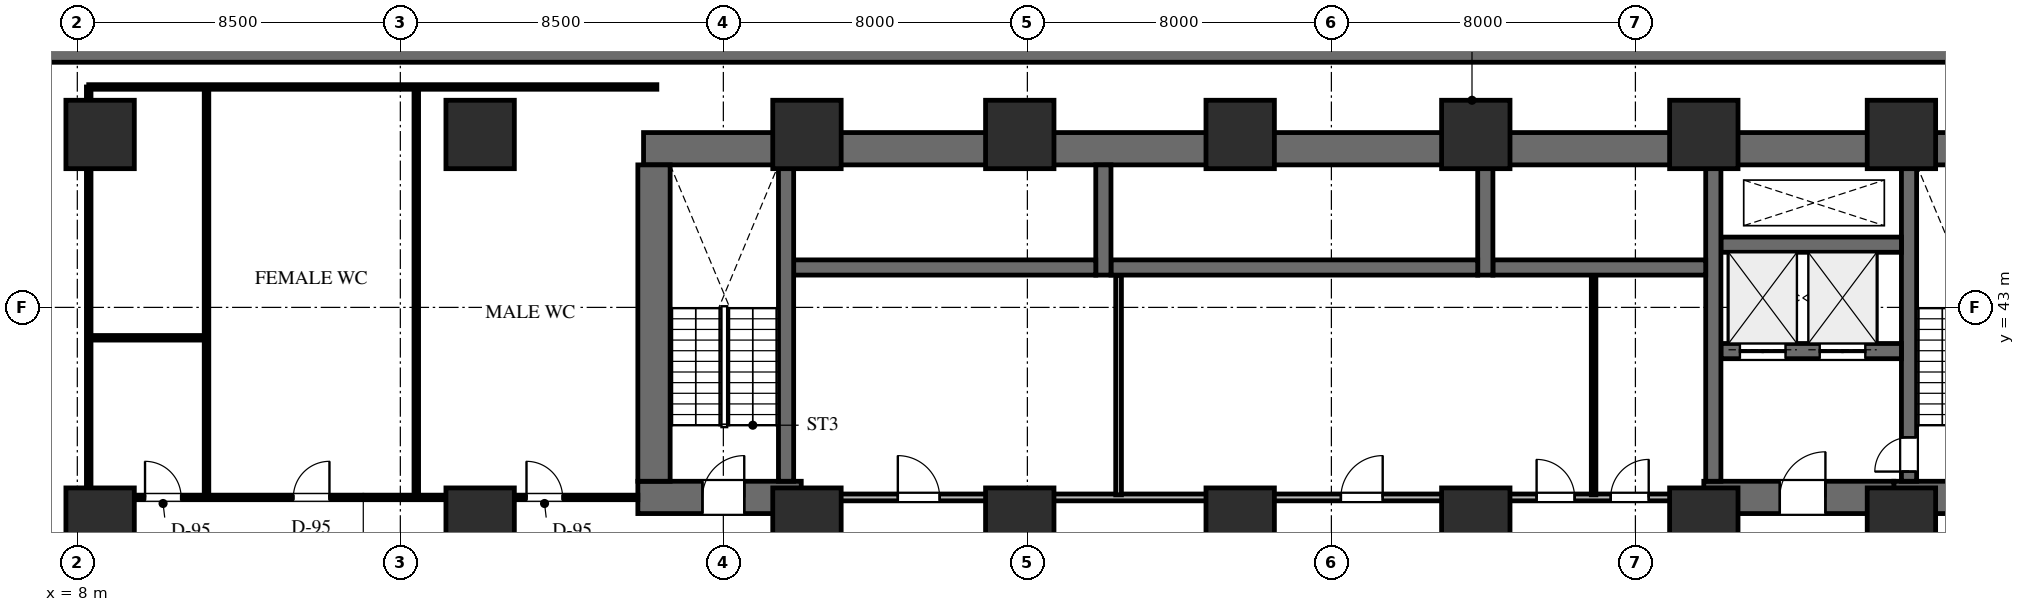
"""IFC4 building model, lengths in metres.
Left out: names, types, materials, properties, quantities, classifications, styles, units other than length and angle.
Written with IfcOpenShell. Run it as: python <this file> out.ifc"""

import sys

from ifc_helpers import new_model, si_unit, direction, frame, frame_2d, origin, origin_2d, place, context, subcontext, project, spatial, rectangle, extrude, element, fill, save


model = new_model("IFC4")
c1 = context("Model", 3, precision=1e-05, world=origin(), true_north=direction((0.0, 1.0)))
c2 = subcontext(c1, "Body", "Model", "MODEL_VIEW")
j1 = project(units=[si_unit("LENGTHUNIT", "METRE"), si_unit("PLANEANGLEUNIT", "RADIAN")], contexts=[c1])
p1 = place(None, origin())
s1 = spatial("IfcSite", under=j1, at=p1, CompositionType="ELEMENT")
p2 = place(p1, origin())
s2 = spatial("IfcBuilding", under=s1, at=p2, CompositionType="ELEMENT")
p3 = place(p2, frame((0.0, 0.0, -4.2)))
s3 = spatial("IfcBuildingStorey", under=s2, at=p3, CompositionType="ELEMENT", Elevation=-4.2)
p4 = place(p3, frame((22.9, 47.175, 0.0), z_axis=(0.0, 0.0, 1.0), x_axis=(1.0, 0.0, 0.0)))
e1 = element("IfcWall", 1, at=p4, inside=s3, PredefinedType="SHEAR", context=c2, shape_type="SweptSolid", body=[
    extrude(rectangle(XDim=43.8, YDim=0.85, at=frame_2d((21.9, 0.0))), origin(), (0.0, 0.0, 1.0), 4.2),
])
p5 = place(p3, frame((55.8, 38.0, 0.0), z_axis=(0.0, 0.0, 1.0), x_axis=(1.0, 0.0, 0.0)))
e2 = element("IfcWall", 2, at=p5, inside=s3, PredefinedType="SHEAR", context=c2, shape_type="SweptSolid", body=[
    extrude(rectangle(XDim=10.9, YDim=0.85, at=frame_2d((5.45, 0.0))), origin(), (0.0, 0.0, 1.0), 4.2),
])
p6 = place(p5, frame((1.5, 0.0, 0.0)))
e3 = element("IfcOpeningElement", 3, at=p6, cuts=e2, PredefinedType="OPENING", context=c2, shape_type="SweptSolid", body=[
    extrude(rectangle(XDim=1.1, YDim=2.2, at=frame_2d((0.55, 1.1))), frame((0.0, 0.435, 0.0), z_axis=(0.0, -1.0, 0.0), x_axis=(1.0, 0.0, 0.0)), (0.0, 0.0, 1.0), 0.87),
])
p7 = place(p5, frame((4.82, 0.0, 0.0)))
e4 = element("IfcOpeningElement", 4, at=p7, cuts=e2, PredefinedType="OPENING", context=c2, shape_type="SweptSolid", body=[
    extrude(rectangle(XDim=1.0, YDim=2.15, at=frame_2d((0.5, 1.075))), frame((0.0, 0.435, 0.0), z_axis=(0.0, -1.0, 0.0), x_axis=(1.0, 0.0, 0.0)), (0.0, 0.0, 1.0), 0.87),
])
p8 = place(p5, frame((8.05, 0.0, 0.0)))
e5 = element("IfcOpeningElement", 5, at=p8, cuts=e2, PredefinedType="OPENING", context=c2, shape_type="SweptSolid", body=[
    extrude(rectangle(XDim=1.1, YDim=2.2, at=frame_2d((0.55, 1.1))), frame((0.0, 0.435, 0.0), z_axis=(0.0, -1.0, 0.0), x_axis=(1.0, 0.0, 0.0)), (0.0, 0.0, 1.0), 0.87),
])
p9 = place(p3, frame((56.2, 38.425, 0.0), z_axis=(0.0, 0.0, 1.0), x_axis=(0.0, 1.0, 0.0)))
e6 = element("IfcWall", 6, at=p9, inside=s3, PredefinedType="SHEAR", context=c2, shape_type="SweptSolid", body=[
    extrude(rectangle(XDim=8.325, YDim=0.4, at=frame_2d((4.163, 0.0))), origin(), (0.0, 0.0, 1.0), 4.2),
])
p10 = place(p9, frame((0.255, 0.0, 0.0)))
e7 = element("IfcOpeningElement", 7, at=p10, cuts=e6, PredefinedType="OPENING", context=c2, shape_type="SweptSolid", body=[
    extrude(rectangle(XDim=0.9, YDim=2.15, at=frame_2d((0.45, 1.075))), frame((0.0, 0.21, 0.0), z_axis=(0.0, -1.0, 0.0), x_axis=(1.0, 0.0, 0.0)), (0.0, 0.0, 1.0), 0.42),
])
p11 = place(p3, frame((50.8, 38.0, 0.0), z_axis=(0.0, 0.0, 1.0), x_axis=(1.0, 0.0, 0.0)))
e8 = element("IfcWall", 8, at=p11, inside=s3, PredefinedType="SHEAR", context=c2, shape_type="SweptSolid", body=[
    extrude(rectangle(XDim=5.0, YDim=0.85, at=frame_2d((2.5, 0.0))), origin(), (0.0, 0.0, 1.0), 4.2),
])
p12 = place(p11, frame((2.0, 0.0, 0.0)))
e9 = element("IfcOpeningElement", 9, at=p12, cuts=e8, PredefinedType="OPENING", context=c2, shape_type="SweptSolid", body=[
    extrude(rectangle(XDim=1.2, YDim=2.2, at=frame_2d((0.6, 1.1))), frame((0.0, 0.435, 0.0), z_axis=(0.0, -1.0, 0.0), x_axis=(1.0, 0.0, 0.0)), (0.0, 0.0, 1.0), 0.87),
])
p13 = place(p3, frame((51.25, 41.85, 0.0), z_axis=(0.0, 0.0, 1.0), x_axis=(1.0, 0.0, 0.0)))
e10 = element("IfcWall", 10, at=p13, inside=s3, PredefinedType="SHEAR", context=c2, shape_type="SweptSolid", body=[
    extrude(rectangle(XDim=4.75, YDim=0.4, at=frame_2d((2.375, 0.0))), origin(), (0.0, 0.0, 1.0), 4.2),
])
p14 = place(p13, frame((0.5, 0.0, 0.0)))
e11 = element("IfcOpeningElement", 11, at=p14, cuts=e10, PredefinedType="OPENING", context=c2, shape_type="SweptSolid", body=[
    extrude(rectangle(XDim=1.2, YDim=2.2, at=frame_2d((0.6, 1.1))), frame((0.0, 0.21, 0.0), z_axis=(0.0, -1.0, 0.0), x_axis=(1.0, 0.0, 0.0)), (0.0, 0.0, 1.0), 0.42),
])
p15 = place(p13, frame((2.6, 0.0, 0.0)))
e12 = element("IfcOpeningElement", 12, at=p15, cuts=e10, PredefinedType="OPENING", context=c2, shape_type="SweptSolid", body=[
    extrude(rectangle(XDim=1.2, YDim=2.2, at=frame_2d((0.6, 1.1))), frame((0.0, 0.21, 0.0), z_axis=(0.0, -1.0, 0.0), x_axis=(1.0, 0.0, 0.0)), (0.0, 0.0, 1.0), 0.42),
])
p16 = place(p3, frame((51.25, 44.65, 0.0), z_axis=(0.0, 0.0, 1.0), x_axis=(1.0, 0.0, 0.0)))
e13 = element("IfcWall", 13, at=p16, inside=s3, PredefinedType="SHEAR", context=c2, shape_type="SweptSolid", body=[
    extrude(rectangle(XDim=4.75, YDim=0.4, at=frame_2d((2.375, 0.0))), origin(), (0.0, 0.0, 1.0), 4.2),
])
p17 = place(p3, frame((51.05, 38.425, 0.0), z_axis=(0.0, 0.0, 1.0), x_axis=(0.0, 1.0, 0.0)))
e14 = element("IfcWall", 14, at=p17, inside=s3, PredefinedType="SHEAR", context=c2, shape_type="SweptSolid", body=[
    extrude(rectangle(XDim=8.325, YDim=0.4, at=frame_2d((4.163, 0.0))), origin(), (0.0, 0.0, 1.0), 4.2),
])
p18 = place(p3, frame((45.25, 44.05, 0.0), z_axis=(0.0, 0.0, 1.0), x_axis=(1.0, 0.0, 0.0)))
e15 = element("IfcWall", 15, at=p18, inside=s3, PredefinedType="SHEAR", context=c2, shape_type="SweptSolid", body=[
    extrude(rectangle(XDim=5.6, YDim=0.4, at=frame_2d((2.8, 0.0))), origin(), (0.0, 0.0, 1.0), 4.2),
])
p19 = place(p3, frame((45.05, 43.85, 0.0), z_axis=(0.0, 0.0, 1.0), x_axis=(0.0, 1.0, 0.0)))
e16 = element("IfcWall", 16, at=p19, inside=s3, PredefinedType="SHEAR", context=c2, shape_type="SweptSolid", body=[
    extrude(rectangle(XDim=2.9, YDim=0.4, at=frame_2d((1.45, 0.0))), origin(), (0.0, 0.0, 1.0), 4.2),
])
p20 = place(p3, frame((35.2, 44.05, 0.0), z_axis=(0.0, 0.0, 1.0), x_axis=(1.0, 0.0, 0.0)))
e17 = element("IfcWall", 17, at=p20, inside=s3, PredefinedType="SHEAR", context=c2, shape_type="SweptSolid", body=[
    extrude(rectangle(XDim=9.65, YDim=0.4, at=frame_2d((4.825, 0.0))), origin(), (0.0, 0.0, 1.0), 4.2),
])
p21 = place(p3, frame((35.0, 43.85, 0.0), z_axis=(0.0, 0.0, 1.0), x_axis=(0.0, 1.0, 0.0)))
e18 = element("IfcWall", 18, at=p21, inside=s3, PredefinedType="SHEAR", context=c2, shape_type="SweptSolid", body=[
    extrude(rectangle(XDim=2.9, YDim=0.4, at=frame_2d((1.45, 0.0))), origin(), (0.0, 0.0, 1.0), 4.2),
])
p22 = place(p3, frame((26.85, 44.05, 0.0), z_axis=(0.0, 0.0, 1.0), x_axis=(1.0, 0.0, 0.0)))
e19 = element("IfcWall", 19, at=p22, inside=s3, PredefinedType="SHEAR", context=c2, shape_type="SweptSolid", body=[
    extrude(rectangle(XDim=7.95, YDim=0.4, at=frame_2d((3.975, 0.0))), origin(), (0.0, 0.0, 1.0), 4.2),
])
p23 = place(p3, frame((22.75, 38.0, 0.0), z_axis=(0.0, 0.0, 1.0), x_axis=(1.0, 0.0, 0.0)))
e20 = element("IfcWall", 20, at=p23, inside=s3, PredefinedType="SHEAR", context=c2, shape_type="SweptSolid", body=[
    extrude(rectangle(XDim=4.3, YDim=0.85, at=frame_2d((2.15, 0.0))), origin(), (0.0, 0.0, 1.0), 4.2),
])
p24 = place(p23, frame((1.7, 0.0, 0.0)))
e21 = element("IfcOpeningElement", 21, at=p24, cuts=e20, PredefinedType="OPENING", context=c2, shape_type="SweptSolid", body=[
    extrude(rectangle(XDim=1.1, YDim=2.2, at=frame_2d((0.55, 1.1))), frame((0.0, 0.435, 0.0), z_axis=(0.0, -1.0, 0.0), x_axis=(1.0, 0.0, 0.0)), (0.0, 0.0, 1.0), 0.87),
])
p25 = place(p3, frame((23.175, 38.425, 0.0), z_axis=(0.0, 0.0, 1.0), x_axis=(0.0, 1.0, 0.0)))
e22 = element("IfcWall", 22, at=p25, inside=s3, PredefinedType="SHEAR", context=c2, shape_type="SweptSolid", body=[
    extrude(rectangle(XDim=8.325, YDim=0.85, at=frame_2d((4.163, 0.0))), origin(), (0.0, 0.0, 1.0), 4.2),
])
p26 = place(p3, frame((26.65, 38.425, 0.0), z_axis=(0.0, 0.0, 1.0), x_axis=(0.0, 1.0, 0.0)))
e23 = element("IfcWall", 23, at=p26, inside=s3, PredefinedType="SHEAR", context=c2, shape_type="SweptSolid", body=[
    extrude(rectangle(XDim=8.325, YDim=0.4, at=frame_2d((4.163, 0.0))), origin(), (0.0, 0.0, 1.0), 4.2),
])
p27 = place(p3, frame((0.0, 49.725, 0.0), z_axis=(0.0, 0.0, 1.0), x_axis=(1.0, 0.0, 0.0)))
e24 = element("IfcWall", 24, at=p27, inside=s3, PredefinedType="SOLIDWALL", context=c2, shape_type="SweptSolid", body=[
    extrude(rectangle(XDim=74.0, YDim=0.55, at=frame_2d((37.0, 0.0))), origin(), (0.0, 0.0, 1.0), 4.2),
])
for number, where, z_axis, x_axis in (
    (25, (56.0, 47.55, 0.0), (0.0, 0.0, 1.0), (1.0, 0.0, 0.0)),
    (26, (56.0, 37.35, 0.0), (0.0, 0.0, 1.0), (1.0, 0.0, 0.0)),
    (27, (50.8, 47.55, 0.0), (0.0, 0.0, 1.0), (1.0, 0.0, 0.0)),
    (28, (50.8, 37.35, 0.0), (0.0, 0.0, 1.0), (1.0, 0.0, 0.0)),
    (29, (44.8, 37.35, 0.0), (0.0, 0.0, 1.0), (1.0, 0.0, 0.0)),
    (30, (44.8, 47.55, 0.0), (0.0, 0.0, 1.0), (1.0, 0.0, 0.0)),
    (31, (38.6, 37.35, 0.0), (0.0, 0.0, 1.0), (1.0, 0.0, 0.0)),
    (32, (38.6, 47.55, 0.0), (0.0, 0.0, 1.0), (1.0, 0.0, 0.0)),
    (33, (32.8, 37.35, 0.0), (0.0, 0.0, 1.0), (1.0, 0.0, 0.0)),
    (34, (32.8, 47.55, 0.0), (0.0, 0.0, 1.0), (1.0, 0.0, 0.0)),
    (35, (27.2, 37.35, 0.0), (0.0, 0.0, 1.0), (1.0, 0.0, 0.0)),
    (36, (27.2, 47.55, 0.0), (0.0, 0.0, 1.0), (1.0, 0.0, 0.0)),
    (37, (18.6, 37.35, 0.0), (0.0, 0.0, 1.0), (1.0, 0.0, 0.0)),
    (38, (18.6, 47.55, 0.0), (0.0, 0.0, 1.0), (1.0, 0.0, 0.0)),
    (39, (8.6, 37.35, 0.0), (0.0, 0.0, 1.0), (1.0, 0.0, 0.0)),
    (40, (8.6, 47.55, 0.0), (0.0, 0.0, 1.0), (1.0, 0.0, 0.0)),
):
    element("IfcColumn", number, at=place(p3, frame(where, z_axis=z_axis, x_axis=x_axis)), inside=s3, PredefinedType="COLUMN", context=c2, shape_type="SweptSolid", body=[
        extrude(rectangle(XDim=1.8, YDim=1.8, at=origin_2d()), origin(), (0.0, 0.0, 1.0), 4.2),
    ])
p28 = place(p3, frame((45.05, 38.0, 0.0), z_axis=(0.0, 0.0, 1.0), x_axis=(1.0, 0.0, 0.0)))
e41 = element("IfcWall", 41, at=p28, inside=s3, PredefinedType="STANDARD", context=c2, shape_type="SweptSolid", body=[
    extrude(rectangle(XDim=5.75, YDim=0.18, at=frame_2d((2.875, 0.0))), origin(), (0.0, 0.0, 1.0), 2.902),
])
p29 = place(p28, frame((1.35, 0.0, 0.0)))
e42 = element("IfcOpeningElement", 42, at=p29, cuts=e41, PredefinedType="OPENING", context=c2, shape_type="SweptSolid", body=[
    extrude(rectangle(XDim=1.0, YDim=2.15, at=frame_2d((0.5, 1.075))), frame((0.0, 0.1, 0.0), z_axis=(0.0, -1.0, 0.0), x_axis=(1.0, 0.0, 0.0)), (0.0, 0.0, 1.0), 0.2),
])
p30 = place(p28, frame((3.3, 0.0, 0.0)))
e43 = element("IfcOpeningElement", 43, at=p30, cuts=e41, PredefinedType="OPENING", context=c2, shape_type="SweptSolid", body=[
    extrude(rectangle(XDim=1.0, YDim=2.15, at=frame_2d((0.5, 1.075))), frame((0.0, 0.1, 0.0), z_axis=(0.0, -1.0, 0.0), x_axis=(1.0, 0.0, 0.0)), (0.0, 0.0, 1.0), 0.2),
])
p31 = place(p3, frame((47.9, 38.068, 0.0), z_axis=(0.0, 0.0, 1.0), x_axis=(0.0, 1.0, 0.0)))
e44 = element("IfcWall", 44, at=p31, inside=s3, PredefinedType="PARTITIONING", context=c2, shape_type="SweptSolid", body=[
    extrude(rectangle(XDim=5.774, YDim=0.12, at=frame_2d((2.887, 0.0))), origin(), (0.0, 0.0, 1.0), 3.85),
])
p32 = place(p3, frame((27.05, 38.0, 0.0), z_axis=(0.0, 0.0, 1.0), x_axis=(1.0, 0.0, 0.0)))
e45 = element("IfcWall", 45, at=p32, inside=s3, PredefinedType="STANDARD", context=c2, shape_type="SweptSolid", body=[
    extrude(rectangle(XDim=18.0, YDim=0.18, at=frame_2d((9.0, 0.0))), origin(), (0.0, 0.0, 1.0), 2.902),
])
p33 = place(p32, frame((2.541, 0.0, 0.0)))
e46 = element("IfcOpeningElement", 46, at=p33, cuts=e45, PredefinedType="OPENING", context=c2, shape_type="SweptSolid", body=[
    extrude(rectangle(XDim=1.1, YDim=2.2, at=frame_2d((0.55, 1.1))), frame((0.0, 0.1, 0.0), z_axis=(0.0, -1.0, 0.0), x_axis=(1.0, 0.0, 0.0)), (0.0, 0.0, 1.0), 0.2),
])
p34 = place(p32, frame((14.2, 0.0, 0.0)))
e47 = element("IfcOpeningElement", 47, at=p34, cuts=e45, PredefinedType="OPENING", context=c2, shape_type="SweptSolid", body=[
    extrude(rectangle(XDim=1.1, YDim=2.2, at=frame_2d((0.55, 1.1))), frame((0.0, 0.1, 0.0), z_axis=(0.0, -1.0, 0.0), x_axis=(1.0, 0.0, 0.0)), (0.0, 0.0, 1.0), 0.2),
])
p35 = place(p3, frame((35.4, 38.068, 0.0), z_axis=(0.0, 0.0, 1.0), x_axis=(0.0, 1.0, 0.0)))
e48 = element("IfcWall", 48, at=p35, inside=s3, PredefinedType="PARTITIONING", context=c2, shape_type="SweptSolid", body=[
    extrude(rectangle(XDim=5.774, YDim=0.15, at=frame_2d((2.887, 0.0))), origin(), (0.0, 0.0, 1.0), 3.85),
])
p36 = place(p3, frame((8.2, 34.4, 0.0), z_axis=(0.0, 0.0, 1.0), x_axis=(0.0, 1.0, 0.0)))
e49 = element("IfcWall", 49, at=p36, inside=s3, PredefinedType="STANDARD", context=c2, shape_type="SweptSolid", body=[
    extrude(rectangle(XDim=3.65, YDim=0.18, at=frame_2d((1.825, 0.0))), origin(), (0.0, 0.0, 1.0), 3.85),
])
p37 = place(p3, frame((8.3, 38.0, 0.0), z_axis=(0.0, 0.0, 1.0), x_axis=(1.0, 0.0, 0.0)))
e50 = element("IfcWall", 50, at=p37, inside=s3, PredefinedType="PARTITIONING", context=c2, shape_type="SweptSolid", body=[
    extrude(rectangle(XDim=14.45, YDim=0.12, at=frame_2d((7.225, 0.0))), origin(), (0.0, 0.0, 1.0), 2.902),
])
p38 = place(p37, frame((1.482, 0.0, 0.0)))
e51 = element("IfcOpeningElement", 51, at=p38, cuts=e50, PredefinedType="OPENING", context=c2, shape_type="SweptSolid", body=[
    extrude(rectangle(XDim=0.95, YDim=2.15, at=frame_2d((0.475, 1.075))), frame((0.0, 0.07, 0.0), z_axis=(0.0, -1.0, 0.0), x_axis=(1.0, 0.0, 0.0)), (0.0, 0.0, 1.0), 0.14),
])
p39 = place(p37, frame((5.385, 0.0, 0.0)))
e52 = element("IfcOpeningElement", 52, at=p39, cuts=e50, PredefinedType="OPENING", context=c2, shape_type="SweptSolid", body=[
    extrude(rectangle(XDim=0.95, YDim=2.15, at=frame_2d((0.475, 1.075))), frame((0.0, 0.07, 0.0), z_axis=(0.0, -1.0, 0.0), x_axis=(1.0, 0.0, 0.0)), (0.0, 0.0, 1.0), 0.14),
])
p40 = place(p37, frame((11.52, 0.0, 0.0)))
e53 = element("IfcOpeningElement", 53, at=p40, cuts=e50, PredefinedType="OPENING", context=c2, shape_type="SweptSolid", body=[
    extrude(rectangle(XDim=0.95, YDim=2.15, at=frame_2d((0.475, 1.075))), frame((0.0, 0.07, 0.0), z_axis=(0.0, -1.0, 0.0), x_axis=(1.0, 0.0, 0.0)), (0.0, 0.0, 1.0), 0.14),
])
p41 = place(p3, frame((8.3, 38.0, 0.0), z_axis=(0.0, 0.0, 1.0), x_axis=(0.0, 1.0, 0.0)))
e54 = element("IfcWall", 54, at=p41, inside=s3, PredefinedType="PARTITIONING", context=c2, shape_type="SweptSolid", body=[
    extrude(rectangle(XDim=10.8, YDim=0.12, at=frame_2d((5.4, 0.0))), origin(), (0.0, 0.0, 1.0), 2.902),
])
p42 = place(p3, frame((8.3, 48.8, 0.0), z_axis=(0.0, 0.0, 1.0), x_axis=(1.0, 0.0, 0.0)))
e55 = element("IfcWall", 55, at=p42, inside=s3, PredefinedType="PARTITIONING", context=c2, shape_type="SweptSolid", body=[
    extrude(rectangle(XDim=14.95, YDim=0.12, at=frame_2d((7.475, 0.0))), origin(), (0.0, 0.0, 1.0), 3.85),
])
for number, where, z_axis, x_axis in (
    (56, (11.4, 38.068, 0.0), (0.0, 0.0, 1.0), (0.0, 1.0, 0.0)),
    (57, (16.92, 38.068, 0.0), (0.0, 0.0, 1.0), (0.0, 1.0, 0.0)),
):
    element("IfcWall", number, at=place(p3, frame(where, z_axis=z_axis, x_axis=x_axis)), inside=s3, PredefinedType="PARTITIONING", context=c2, shape_type="SweptSolid", body=[
        extrude(rectangle(XDim=10.664, YDim=0.12, at=frame_2d((5.332, 0.0))), origin(), (0.0, 0.0, 1.0), 2.902),
    ])
p43 = place(p3, frame((8.368, 42.2, 0.0), z_axis=(0.0, 0.0, 1.0), x_axis=(1.0, 0.0, 0.0)))
e58 = element("IfcWall", 58, at=p43, inside=s3, PredefinedType="PARTITIONING", context=c2, shape_type="SweptSolid", body=[
    extrude(rectangle(XDim=2.964, YDim=0.12, at=frame_2d((1.482, 0.0))), origin(), (0.0, 0.0, 1.0), 2.902),
])
p44 = place(p12, origin())
e59 = element("IfcDoor", 59, at=p44, inside=s3, OperationType="SINGLE_SWING_RIGHT", PredefinedType="DOOR", context=c2, shape_type="SweptSolid", body=[
    extrude(rectangle(XDim=1.2, YDim=2.2, at=frame_2d((0.6, 1.1))), frame((0.0, 0.025, 0.0), z_axis=(0.0, -1.0, 0.0), x_axis=(1.0, 0.0, 0.0)), (0.0, 0.0, 1.0), 0.05),
])
fill(e9, e59)
p45 = place(p10, origin())
e60 = element("IfcDoor", 60, at=p45, inside=s3, OperationType="SINGLE_SWING_LEFT", PredefinedType="DOOR", context=c2, shape_type="SweptSolid", body=[
    extrude(rectangle(XDim=0.9, YDim=2.15, at=frame_2d((0.45, 1.075))), frame((0.0, 0.025, 0.0), z_axis=(0.0, -1.0, 0.0), x_axis=(1.0, 0.0, 0.0)), (0.0, 0.0, 1.0), 0.05),
])
fill(e7, e60)
p46 = place(p24, origin())
e61 = element("IfcDoor", 61, at=p46, inside=s3, OperationType="SINGLE_SWING_RIGHT", PredefinedType="DOOR", context=c2, shape_type="SweptSolid", body=[
    extrude(rectangle(XDim=1.1, YDim=2.2, at=frame_2d((0.55, 1.1))), frame((0.0, 0.025, 0.0), z_axis=(0.0, -1.0, 0.0), x_axis=(1.0, 0.0, 0.0)), (0.0, 0.0, 1.0), 0.05),
])
fill(e21, e61)
p47 = place(p14, origin())
e62 = element("IfcDoor", 62, at=p47, inside=s3, OperationType="DOUBLE_DOOR_SLIDING", PredefinedType="DOOR", context=c2, shape_type="SweptSolid", body=[
    extrude(rectangle(XDim=1.2, YDim=2.2, at=frame_2d((0.6, 1.1))), frame((0.0, 0.025, 0.0), z_axis=(0.0, -1.0, 0.0), x_axis=(1.0, 0.0, 0.0)), (0.0, 0.0, 1.0), 0.05),
])
fill(e11, e62)
p48 = place(p15, origin())
e63 = element("IfcDoor", 63, at=p48, inside=s3, OperationType="DOUBLE_DOOR_SLIDING", PredefinedType="DOOR", context=c2, shape_type="SweptSolid", body=[
    extrude(rectangle(XDim=1.2, YDim=2.2, at=frame_2d((0.6, 1.1))), frame((0.0, 0.025, 0.0), z_axis=(0.0, -1.0, 0.0), x_axis=(1.0, 0.0, 0.0)), (0.0, 0.0, 1.0), 0.05),
])
fill(e12, e63)
p49 = place(p29, origin())
e64 = element("IfcDoor", 64, at=p49, inside=s3, OperationType="SINGLE_SWING_LEFT", PredefinedType="DOOR", context=c2, shape_type="SweptSolid", body=[
    extrude(rectangle(XDim=1.0, YDim=2.15, at=frame_2d((0.5, 1.075))), frame((0.0, 0.025, 0.0), z_axis=(0.0, -1.0, 0.0), x_axis=(1.0, 0.0, 0.0)), (0.0, 0.0, 1.0), 0.05),
])
fill(e42, e64)
p50 = place(p30, origin())
e65 = element("IfcDoor", 65, at=p50, inside=s3, OperationType="SINGLE_SWING_RIGHT", PredefinedType="DOOR", context=c2, shape_type="SweptSolid", body=[
    extrude(rectangle(XDim=1.0, YDim=2.15, at=frame_2d((0.5, 1.075))), frame((0.0, 0.025, 0.0), z_axis=(0.0, -1.0, 0.0), x_axis=(1.0, 0.0, 0.0)), (0.0, 0.0, 1.0), 0.05),
])
fill(e43, e65)
p51 = place(p33, origin())
e66 = element("IfcDoor", 66, at=p51, inside=s3, OperationType="SINGLE_SWING_LEFT", PredefinedType="DOOR", context=c2, shape_type="SweptSolid", body=[
    extrude(rectangle(XDim=1.1, YDim=2.2, at=frame_2d((0.55, 1.1))), frame((0.0, 0.025, 0.0), z_axis=(0.0, -1.0, 0.0), x_axis=(1.0, 0.0, 0.0)), (0.0, 0.0, 1.0), 0.05),
])
fill(e46, e66)
p52 = place(p34, origin())
e67 = element("IfcDoor", 67, at=p52, inside=s3, OperationType="SINGLE_SWING_RIGHT", PredefinedType="DOOR", context=c2, shape_type="SweptSolid", body=[
    extrude(rectangle(XDim=1.1, YDim=2.2, at=frame_2d((0.55, 1.1))), frame((0.0, 0.025, 0.0), z_axis=(0.0, -1.0, 0.0), x_axis=(1.0, 0.0, 0.0)), (0.0, 0.0, 1.0), 0.05),
])
fill(e47, e67)
p53 = place(p38, origin())
e68 = element("IfcDoor", 68, at=p53, inside=s3, OperationType="SINGLE_SWING_LEFT", PredefinedType="DOOR", context=c2, shape_type="SweptSolid", body=[
    extrude(rectangle(XDim=0.95, YDim=2.15, at=frame_2d((0.475, 1.075))), frame((0.0, 0.025, 0.0), z_axis=(0.0, -1.0, 0.0), x_axis=(1.0, 0.0, 0.0)), (0.0, 0.0, 1.0), 0.05),
])
fill(e51, e68)
p54 = place(p39, origin())
e69 = element("IfcDoor", 69, at=p54, inside=s3, OperationType="SINGLE_SWING_RIGHT", PredefinedType="DOOR", context=c2, shape_type="SweptSolid", body=[
    extrude(rectangle(XDim=0.95, YDim=2.15, at=frame_2d((0.475, 1.075))), frame((0.0, 0.025, 0.0), z_axis=(0.0, -1.0, 0.0), x_axis=(1.0, 0.0, 0.0)), (0.0, 0.0, 1.0), 0.05),
])
fill(e52, e69)
p55 = place(p40, origin())
e70 = element("IfcDoor", 70, at=p55, inside=s3, OperationType="SINGLE_SWING_LEFT", PredefinedType="DOOR", context=c2, shape_type="SweptSolid", body=[
    extrude(rectangle(XDim=0.95, YDim=2.15, at=frame_2d((0.475, 1.075))), frame((0.0, 0.025, 0.0), z_axis=(0.0, -1.0, 0.0), x_axis=(1.0, 0.0, 0.0)), (0.0, 0.0, 1.0), 0.05),
])
fill(e53, e70)
save(model, sys.argv[1])
